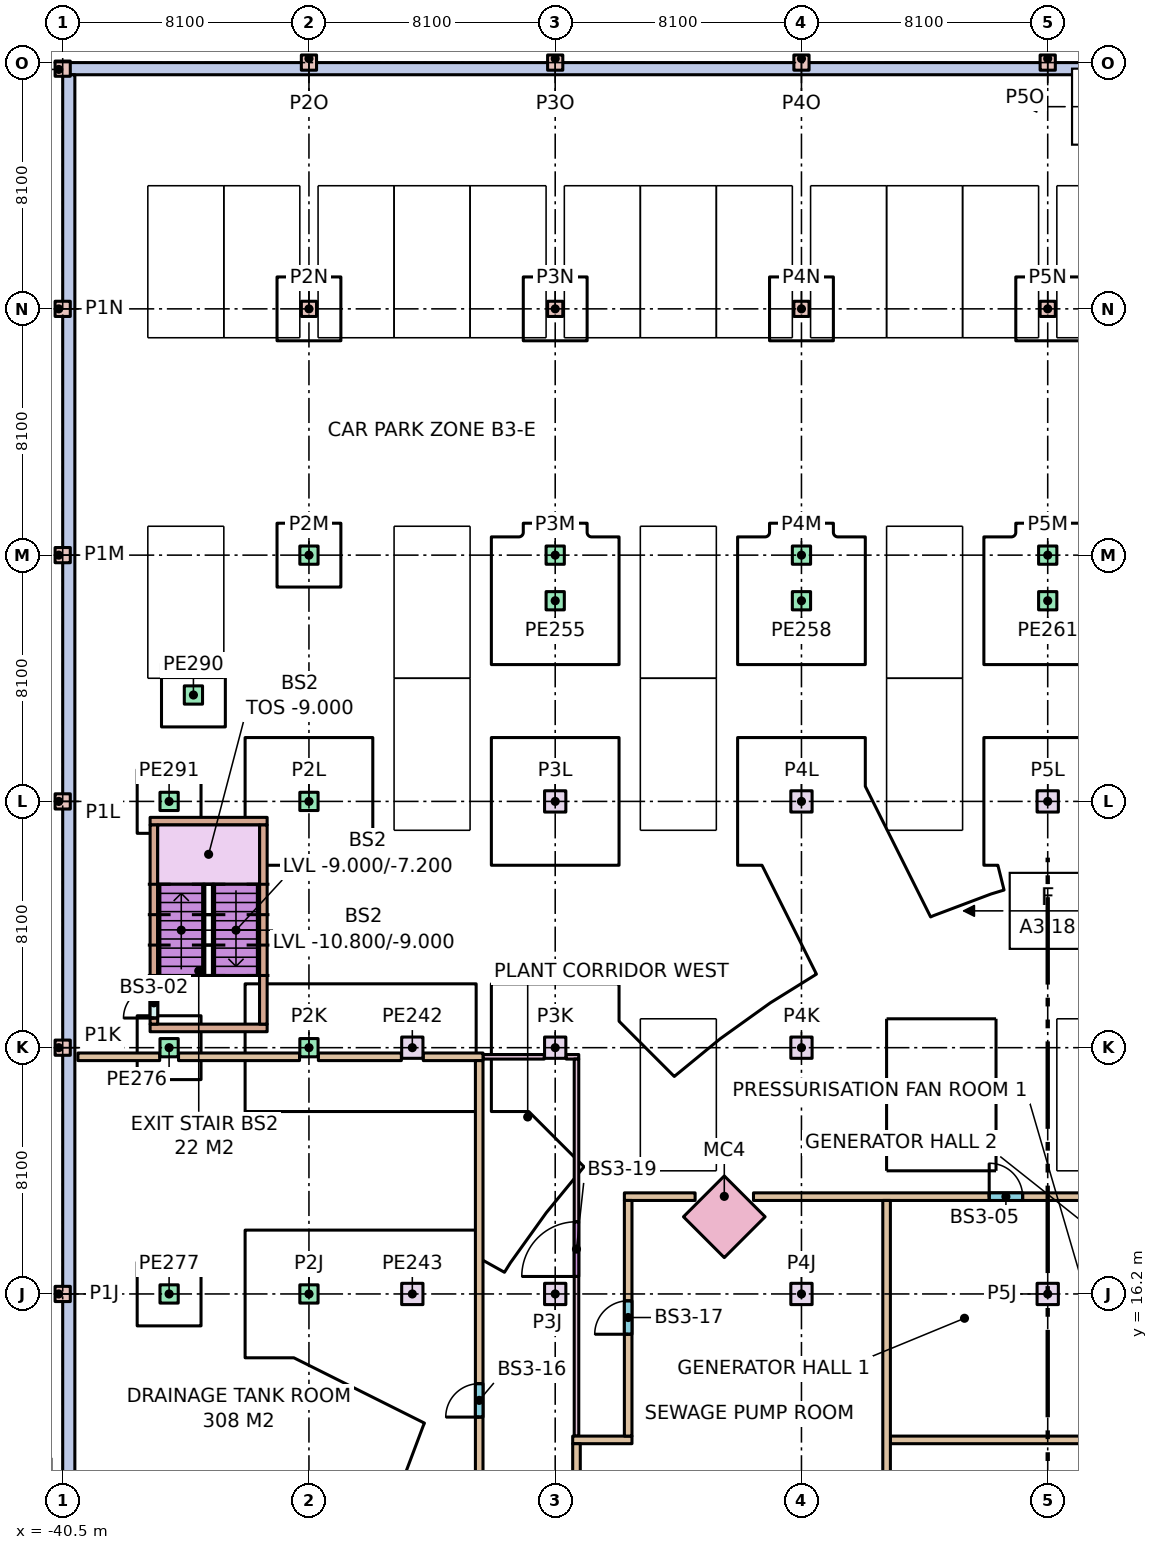
"""IFC4 building model, lengths in metres.
Left out: names, types, materials, properties, quantities, classifications, styles, units other than length and angle.
Written with IfcOpenShell. Run it as: python <this file> out.ifc"""

import sys

from ifc_helpers import new_model, si_unit, direction, frame, frame_2d, origin, origin_2d, place, context, subcontext, project, spatial, rectangle, extrude, element, fill, save


model = new_model("IFC4")
c1 = context("Model", 3, precision=1e-05, world=origin(), true_north=direction((0.0, 1.0)))
c2 = subcontext(c1, "Body", "Model", "MODEL_VIEW")
j1 = project(units=[si_unit("LENGTHUNIT", "METRE"), si_unit("PLANEANGLEUNIT", "RADIAN")], contexts=[c1])
p1 = place(None, origin())
s1 = spatial("IfcSite", under=j1, at=p1, CompositionType="ELEMENT")
p2 = place(p1, origin())
s2 = spatial("IfcBuilding", under=s1, at=p2, CompositionType="ELEMENT")
p3 = place(p2, frame((0.0, 0.0, -10.8)))
s3 = spatial("IfcBuildingStorey", under=s2, at=p3, CompositionType="ELEMENT", Elevation=-10.8)
p4 = place(p3, frame((-40.5, 56.5, 0.0), z_axis=(0.0, 0.0, 1.0), x_axis=(1.0, 0.0, 0.0)))
e1 = element("IfcWall", 1, at=p4, inside=s3, PredefinedType="SOLIDWALL", context=c2, shape_type="SweptSolid", body=[
    extrude(rectangle(XDim=129.6, YDim=0.4, at=frame_2d((64.8, 0.0))), origin(), (0.0, 0.0, 1.0), 3.6),
])
p5 = place(p3, frame((-40.3, -56.3, 0.0), z_axis=(0.0, 0.0, 1.0), x_axis=(0.0, 1.0, 0.0)))
e2 = element("IfcWall", 2, at=p5, inside=s3, PredefinedType="SOLIDWALL", context=c2, shape_type="SweptSolid", body=[
    extrude(rectangle(XDim=112.6, YDim=0.4, at=frame_2d((56.3, 0.0))), origin(), (0.0, 0.0, 1.0), 3.6),
])
for number, where, z_axis, x_axis in (
    (3, (-40.5, 16.2, 0.0), (0.0, 0.0, 1.0), (1.0, 0.0, 0.0)),
    (4, (-40.5, 24.3, 0.0), (0.0, 0.0, 1.0), (1.0, 0.0, 0.0)),
    (5, (-40.5, 32.4, 0.0), (0.0, 0.0, 1.0), (1.0, 0.0, 0.0)),
    (6, (-40.5, 40.5, 0.0), (0.0, 0.0, 1.0), (1.0, 0.0, 0.0)),
    (7, (-40.5, 48.6, 0.0), (0.0, 0.0, 1.0), (1.0, 0.0, 0.0)),
    (8, (-40.5, 56.5, 0.0), (0.0, 0.0, 1.0), (1.0, 0.0, 0.0)),
):
    element("IfcColumn", number, at=place(p3, frame(where, z_axis=z_axis, x_axis=x_axis)), inside=s3, PredefinedType="COLUMN", context=c2, shape_type="SweptSolid", body=[
        extrude(rectangle(XDim=0.5, YDim=0.5, at=origin_2d()), origin(), (0.0, 0.0, 1.0), 3.6),
    ])
for number, where, z_axis, x_axis in (
    (9, (-32.4, 16.2, 0.0), (0.0, 0.0, 1.0), (1.0, 0.0, 0.0)),
    (10, (-32.4, 24.3, 0.0), (0.0, 0.0, 1.0), (1.0, 0.0, 0.0)),
    (11, (-32.4, 32.4, 0.0), (0.0, 0.0, 1.0), (1.0, 0.0, 0.0)),
    (12, (-32.4, 40.5, 0.0), (0.0, 0.0, 1.0), (1.0, 0.0, 0.0)),
):
    element("IfcColumn", number, at=place(p3, frame(where, z_axis=z_axis, x_axis=x_axis)), inside=s3, PredefinedType="COLUMN", context=c2, shape_type="SweptSolid", body=[
        extrude(rectangle(XDim=0.6, YDim=0.6, at=origin_2d()), origin(), (0.0, 0.0, 1.0), 3.6),
    ])
for number, where, z_axis, x_axis in (
    (13, (-32.4, 48.6, 0.0), (0.0, 0.0, 1.0), (1.0, 0.0, 0.0)),
    (14, (-32.4, 56.7, 0.0), (0.0, 0.0, 1.0), (1.0, 0.0, 0.0)),
):
    element("IfcColumn", number, at=place(p3, frame(where, z_axis=z_axis, x_axis=x_axis)), inside=s3, PredefinedType="COLUMN", context=c2, shape_type="SweptSolid", body=[
        extrude(rectangle(XDim=0.5, YDim=0.5, at=origin_2d()), origin(), (0.0, 0.0, 1.0), 3.6),
    ])
for number, where, z_axis, x_axis in (
    (15, (-24.3, 16.2, 0.0), (0.0, 0.0, 1.0), (1.0, 0.0, 0.0)),
    (16, (-24.3, 24.3, 0.0), (0.0, 0.0, 1.0), (1.0, 0.0, 0.0)),
    (17, (-24.3, 32.4, 0.0), (0.0, 0.0, 1.0), (1.0, 0.0, 0.0)),
):
    element("IfcColumn", number, at=place(p3, frame(where, z_axis=z_axis, x_axis=x_axis)), inside=s3, PredefinedType="COLUMN", context=c2, shape_type="SweptSolid", body=[
        extrude(rectangle(XDim=0.7, YDim=0.7, at=origin_2d()), origin(), (0.0, 0.0, 1.0), 3.6),
    ])
p6 = place(p3, frame((-24.3, 40.5, 0.0), z_axis=(0.0, 0.0, 1.0), x_axis=(1.0, 0.0, 0.0)))
e18 = element("IfcColumn", 18, at=p6, inside=s3, PredefinedType="COLUMN", context=c2, shape_type="SweptSolid", body=[
    extrude(rectangle(XDim=0.6, YDim=0.6, at=origin_2d()), origin(), (0.0, 0.0, 1.0), 3.6),
])
for number, where, z_axis, x_axis in (
    (19, (-24.3, 48.6, 0.0), (0.0, 0.0, 1.0), (1.0, 0.0, 0.0)),
    (20, (-24.3, 56.7, 0.0), (0.0, 0.0, 1.0), (1.0, 0.0, 0.0)),
):
    element("IfcColumn", number, at=place(p3, frame(where, z_axis=z_axis, x_axis=x_axis)), inside=s3, PredefinedType="COLUMN", context=c2, shape_type="SweptSolid", body=[
        extrude(rectangle(XDim=0.5, YDim=0.5, at=origin_2d()), origin(), (0.0, 0.0, 1.0), 3.6),
    ])
for number, where, z_axis, x_axis in (
    (21, (-16.2, 16.2, 0.0), (0.0, 0.0, 1.0), (1.0, 0.0, 0.0)),
    (22, (-16.2, 24.3, 0.0), (0.0, 0.0, 1.0), (1.0, 0.0, 0.0)),
    (23, (-16.2, 32.4, 0.0), (0.0, 0.0, 1.0), (1.0, 0.0, 0.0)),
):
    element("IfcColumn", number, at=place(p3, frame(where, z_axis=z_axis, x_axis=x_axis)), inside=s3, PredefinedType="COLUMN", context=c2, shape_type="SweptSolid", body=[
        extrude(rectangle(XDim=0.7, YDim=0.7, at=origin_2d()), origin(), (0.0, 0.0, 1.0), 3.6),
    ])
p7 = place(p3, frame((-16.2, 40.5, 0.0), z_axis=(0.0, 0.0, 1.0), x_axis=(1.0, 0.0, 0.0)))
e24 = element("IfcColumn", 24, at=p7, inside=s3, PredefinedType="COLUMN", context=c2, shape_type="SweptSolid", body=[
    extrude(rectangle(XDim=0.6, YDim=0.6, at=origin_2d()), origin(), (0.0, 0.0, 1.0), 3.6),
])
for number, where, z_axis, x_axis in (
    (25, (-16.2, 48.6, 0.0), (0.0, 0.0, 1.0), (1.0, 0.0, 0.0)),
    (26, (-16.2, 56.7, 0.0), (0.0, 0.0, 1.0), (1.0, 0.0, 0.0)),
):
    element("IfcColumn", number, at=place(p3, frame(where, z_axis=z_axis, x_axis=x_axis)), inside=s3, PredefinedType="COLUMN", context=c2, shape_type="SweptSolid", body=[
        extrude(rectangle(XDim=0.5, YDim=0.5, at=origin_2d()), origin(), (0.0, 0.0, 1.0), 3.6),
    ])
for number, where, z_axis, x_axis in (
    (27, (-8.1, 16.2, 0.0), (0.0, 0.0, 1.0), (1.0, 0.0, 0.0)),
    (28, (-8.1, 32.4, 0.0), (0.0, 0.0, 1.0), (1.0, 0.0, 0.0)),
):
    element("IfcColumn", number, at=place(p3, frame(where, z_axis=z_axis, x_axis=x_axis)), inside=s3, PredefinedType="COLUMN", context=c2, shape_type="SweptSolid", body=[
        extrude(rectangle(XDim=0.7, YDim=0.7, at=origin_2d()), origin(), (0.0, 0.0, 1.0), 3.6),
    ])
p8 = place(p3, frame((-8.1, 40.5, 0.0), z_axis=(0.0, 0.0, 1.0), x_axis=(1.0, 0.0, 0.0)))
e29 = element("IfcColumn", 29, at=p8, inside=s3, PredefinedType="COLUMN", context=c2, shape_type="SweptSolid", body=[
    extrude(rectangle(XDim=0.6, YDim=0.6, at=origin_2d()), origin(), (0.0, 0.0, 1.0), 3.6),
])
for number, where, z_axis, x_axis in (
    (30, (-8.1, 48.6, 0.0), (0.0, 0.0, 1.0), (1.0, 0.0, 0.0)),
    (31, (-8.1, 56.7, 0.0), (0.0, 0.0, 1.0), (1.0, 0.0, 0.0)),
):
    element("IfcColumn", number, at=place(p3, frame(where, z_axis=z_axis, x_axis=x_axis)), inside=s3, PredefinedType="COLUMN", context=c2, shape_type="SweptSolid", body=[
        extrude(rectangle(XDim=0.5, YDim=0.5, at=origin_2d()), origin(), (0.0, 0.0, 1.0), 3.6),
    ])
for number, where, z_axis, x_axis in (
    (32, (-29.0, 24.3, 0.0), (0.0, 0.0, 1.0), (1.0, 0.0, 0.0)),
    (33, (-29.0, 16.2, 0.0), (0.0, 0.0, 1.0), (1.0, 0.0, 0.0)),
):
    element("IfcColumn", number, at=place(p3, frame(where, z_axis=z_axis, x_axis=x_axis)), inside=s3, PredefinedType="COLUMN", context=c2, shape_type="SweptSolid", body=[
        extrude(rectangle(XDim=0.7, YDim=0.7, at=origin_2d()), origin(), (0.0, 0.0, 1.0), 3.6),
    ])
for number, where, z_axis, x_axis in (
    (34, (-24.3, 39.0, 0.0), (0.0, 0.0, 1.0), (1.0, 0.0, 0.0)),
    (35, (-16.2, 39.0, 0.0), (0.0, 0.0, 1.0), (1.0, 0.0, 0.0)),
    (36, (-8.1, 39.0, 0.0), (0.0, 0.0, 1.0), (1.0, 0.0, 0.0)),
    (37, (-37.0, 24.3, 0.0), (0.0, 0.0, 1.0), (1.0, 0.0, 0.0)),
    (38, (-37.0, 16.2, 0.0), (0.0, 0.0, 1.0), (1.0, 0.0, 0.0)),
    (39, (-36.2, 35.9, 0.0), (0.0, 0.0, 1.0), (1.0, 0.0, 0.0)),
    (40, (-37.0, 32.4, 0.0), (0.0, 0.0, 1.0), (1.0, 0.0, 0.0)),
):
    element("IfcColumn", number, at=place(p3, frame(where, z_axis=z_axis, x_axis=x_axis)), inside=s3, PredefinedType="COLUMN", context=c2, shape_type="SweptSolid", body=[
        extrude(rectangle(XDim=0.6, YDim=0.6, at=origin_2d()), origin(), (0.0, 0.0, 1.0), 3.6),
    ])
p9 = place(p3, frame((-18.738, 18.738, 0.0), z_axis=(0.0, 0.0, 1.0), x_axis=(-0.707106781187, -0.707106781187, 0.0)))
e41 = element("IfcColumn", 41, at=p9, inside=s3, PredefinedType="COLUMN", context=c2, shape_type="SweptSolid", body=[
    extrude(rectangle(XDim=1.9, YDim=1.9, at=origin_2d()), origin(), (0.0, 0.0, 1.0), 3.6),
])
for number, where, z_axis, x_axis in (
    (42, (-37.625, 24.95, 0.0), (0.0, 0.0, 1.0), (1.0, 0.0, 0.0)),
    (43, (-37.625, 31.75, 0.0), (0.0, 0.0, 1.0), (1.0, 0.0, 0.0)),
):
    element("IfcWall", number, at=place(p3, frame(where, z_axis=z_axis, x_axis=x_axis)), inside=s3, PredefinedType="STANDARD", context=c2, shape_type="SweptSolid", body=[
        extrude(rectangle(XDim=3.85, YDim=0.25, at=frame_2d((1.925, 0.0))), origin(), (0.0, 0.0, 1.0), 3.28),
    ])
p10 = place(p3, frame((-37.5, 25.075, 0.0), z_axis=(0.0, 0.0, 1.0), x_axis=(0.0, 1.0, 0.0)))
e44 = element("IfcWall", 44, at=p10, inside=s3, PredefinedType="STANDARD", context=c2, shape_type="SweptSolid", body=[
    extrude(rectangle(XDim=6.55, YDim=0.25, at=frame_2d((3.275, 0.0))), origin(), (0.0, 0.0, 1.0), 3.28),
])
p11 = place(p10, frame((0.2, 0.0, 0.0)))
e45 = element("IfcOpeningElement", 45, at=p11, cuts=e44, PredefinedType="OPENING", context=c2, shape_type="SweptSolid", body=[
    extrude(rectangle(XDim=1.0, YDim=2.1, at=frame_2d((0.5, 1.05))), frame((0.0, 0.135, 0.0), z_axis=(0.0, -1.0, 0.0), x_axis=(1.0, 0.0, 0.0)), (0.0, 0.0, 1.0), 0.27),
])
p12 = place(p3, frame((-33.9, 25.075, 0.0), z_axis=(0.0, 0.0, 1.0), x_axis=(0.0, 1.0, 0.0)))
e46 = element("IfcWall", 46, at=p12, inside=s3, PredefinedType="STANDARD", context=c2, shape_type="SweptSolid", body=[
    extrude(rectangle(XDim=6.55, YDim=0.25, at=frame_2d((3.275, 0.0))), origin(), (0.0, 0.0, 1.0), 3.28),
])
p13 = place(p3, frame((-13.275, 11.4, 0.0), z_axis=(0.0, 0.0, 1.0), x_axis=(1.0, 0.0, 0.0)))
e47 = element("IfcWall", 47, at=p13, inside=s3, PredefinedType="PARTITIONING", context=c2, shape_type="SweptSolid", body=[
    extrude(rectangle(XDim=34.55, YDim=0.25, at=frame_2d((17.275, 0.0))), origin(), (0.0, 0.0, 1.0), 3.28),
])
p14 = place(p3, frame((-26.675, 24.0, 0.0), z_axis=(0.0, 0.0, 1.0), x_axis=(1.0, 0.0, 0.0)))
e48 = element("IfcWall", 48, at=p14, inside=s3, PredefinedType="PARTITIONING", context=c2, shape_type="SweptSolid", body=[
    extrude(rectangle(XDim=2.015, YDim=0.15, at=frame_2d((1.008, 0.0))), origin(), (0.0, 0.0, 1.0), 3.28),
])
p15 = place(p3, frame((-23.94, 24.0, 0.0), z_axis=(0.0, 0.0, 1.0), x_axis=(1.0, 0.0, 0.0)))
e49 = element("IfcWall", 49, at=p15, inside=s3, PredefinedType="PARTITIONING", context=c2, shape_type="SweptSolid", body=[
    extrude(rectangle(XDim=0.415, YDim=0.15, at=frame_2d((0.208, 0.0))), origin(), (0.0, 0.0, 1.0), 3.28),
])
p16 = place(p3, frame((-23.6, 11.525, 0.0), z_axis=(0.0, 0.0, 1.0), x_axis=(0.0, 1.0, 0.0)))
e50 = element("IfcWall", 50, at=p16, inside=s3, PredefinedType="PARTITIONING", context=c2, shape_type="SweptSolid", body=[
    extrude(rectangle(XDim=12.4, YDim=0.15, at=frame_2d((6.2, 0.0))), origin(), (0.0, 0.0, 1.0), 3.28),
])
p17 = place(p16, frame((5.25, 0.0, 0.0)))
e51 = element("IfcOpeningElement", 51, at=p17, cuts=e50, PredefinedType="OPENING", context=c2, shape_type="SweptSolid", body=[
    extrude(rectangle(XDim=1.8, YDim=2.4, at=frame_2d((0.9, 1.2))), frame((0.0, 0.085, 0.0), z_axis=(0.0, -1.0, 0.0), x_axis=(1.0, 0.0, 0.0)), (0.0, 0.0, 1.0), 0.17),
])
p18 = place(p3, frame((-40.0, 24.0, 0.0), z_axis=(0.0, 0.0, 1.0), x_axis=(1.0, 0.0, 0.0)))
e52 = element("IfcWall", 52, at=p18, inside=s3, PredefinedType="PARTITIONING", context=c2, shape_type="SweptSolid", body=[
    extrude(rectangle(XDim=2.69, YDim=0.25, at=frame_2d((1.345, 0.0))), origin(), (0.0, 0.0, 1.0), 3.28),
])
p19 = place(p3, frame((-36.69, 24.0, 0.0), z_axis=(0.0, 0.0, 1.0), x_axis=(1.0, 0.0, 0.0)))
e53 = element("IfcWall", 53, at=p19, inside=s3, PredefinedType="PARTITIONING", context=c2, shape_type="SweptSolid", body=[
    extrude(rectangle(XDim=3.98, YDim=0.25, at=frame_2d((1.99, 0.0))), origin(), (0.0, 0.0, 1.0), 3.28),
])
p20 = place(p3, frame((-32.09, 24.0, 0.0), z_axis=(0.0, 0.0, 1.0), x_axis=(1.0, 0.0, 0.0)))
e54 = element("IfcWall", 54, at=p20, inside=s3, PredefinedType="PARTITIONING", context=c2, shape_type="SweptSolid", body=[
    extrude(rectangle(XDim=2.73, YDim=0.25, at=frame_2d((1.365, 0.0))), origin(), (0.0, 0.0, 1.0), 3.28),
])
p21 = place(p3, frame((-28.64, 24.0, 0.0), z_axis=(0.0, 0.0, 1.0), x_axis=(1.0, 0.0, 0.0)))
e55 = element("IfcWall", 55, at=p21, inside=s3, PredefinedType="PARTITIONING", context=c2, shape_type="SweptSolid", body=[
    extrude(rectangle(XDim=1.965, YDim=0.25, at=frame_2d((0.982, 0.0))), origin(), (0.0, 0.0, 1.0), 3.28),
])
p22 = place(p3, frame((-23.725, 11.4, 0.0), z_axis=(0.0, 0.0, 1.0), x_axis=(1.0, 0.0, 0.0)))
e56 = element("IfcWall", 56, at=p22, inside=s3, PredefinedType="PARTITIONING", context=c2, shape_type="SweptSolid", body=[
    extrude(rectangle(XDim=1.95, YDim=0.25, at=frame_2d((0.975, 0.0))), origin(), (0.0, 0.0, 1.0), 3.28),
])
p23 = place(p3, frame((-22.025, 19.4, 0.0), z_axis=(0.0, 0.0, 1.0), x_axis=(1.0, 0.0, 0.0)))
e57 = element("IfcWall", 57, at=p23, inside=s3, PredefinedType="PARTITIONING", context=c2, shape_type="SweptSolid", body=[
    extrude(rectangle(XDim=2.327, YDim=0.25, at=frame_2d((1.163, 0.0))), origin(), (0.0, 0.0, 1.0), 3.28),
])
p24 = place(p3, frame((-17.778, 19.4, 0.0), z_axis=(0.0, 0.0, 1.0), x_axis=(1.0, 0.0, 0.0)))
e58 = element("IfcWall", 58, at=p24, inside=s3, PredefinedType="PARTITIONING", context=c2, shape_type="SweptSolid", body=[
    extrude(rectangle(XDim=35.557, YDim=0.25, at=frame_2d((17.778, 0.0))), origin(), (0.0, 0.0, 1.0), 3.28),
])
p25 = place(p24, frame((7.753, 0.0, 0.0)))
e59 = element("IfcOpeningElement", 59, at=p25, cuts=e58, PredefinedType="OPENING", context=c2, shape_type="SweptSolid", body=[
    extrude(rectangle(XDim=1.1, YDim=2.1, at=frame_2d((0.55, 1.05))), frame((0.0, 0.135, 0.0), z_axis=(0.0, -1.0, 0.0), x_axis=(1.0, 0.0, 0.0)), (0.0, 0.0, 1.0), 0.27),
])
p26 = place(p24, frame((15.41, 0.0, 0.0)))
e60 = element("IfcOpeningElement", 60, at=p26, cuts=e58, PredefinedType="OPENING", context=c2, shape_type="SweptSolid", body=[
    extrude(rectangle(XDim=1.1, YDim=2.1, at=frame_2d((0.55, 1.05))), frame((0.0, 0.135, 0.0), z_axis=(0.0, -1.0, 0.0), x_axis=(1.0, 0.0, 0.0)), (0.0, 0.0, 1.0), 0.27),
])
p27 = place(p24, frame((22.167, 0.0, 0.0)))
e61 = element("IfcOpeningElement", 61, at=p27, cuts=e58, PredefinedType="OPENING", context=c2, shape_type="SweptSolid", body=[
    extrude(rectangle(XDim=1.0, YDim=2.1, at=frame_2d((0.5, 1.05))), frame((0.0, 0.135, 0.0), z_axis=(0.0, -1.0, 0.0), x_axis=(1.0, 0.0, 0.0)), (0.0, 0.0, 1.0), 0.27),
])
p28 = place(p24, frame((30.01, 0.0, 0.0)))
e62 = element("IfcOpeningElement", 62, at=p28, cuts=e58, PredefinedType="OPENING", context=c2, shape_type="SweptSolid", body=[
    extrude(rectangle(XDim=1.1, YDim=2.1, at=frame_2d((0.55, 1.05))), frame((0.0, 0.135, 0.0), z_axis=(0.0, -1.0, 0.0), x_axis=(1.0, 0.0, 0.0)), (0.0, 0.0, 1.0), 0.27),
])
p29 = place(p3, frame((-21.9, 11.525, 0.0), z_axis=(0.0, 0.0, 1.0), x_axis=(0.0, 1.0, 0.0)))
e63 = element("IfcWall", 63, at=p29, inside=s3, PredefinedType="PARTITIONING", context=c2, shape_type="SweptSolid", body=[
    extrude(rectangle(XDim=7.75, YDim=0.25, at=frame_2d((3.875, 0.0))), origin(), (0.0, 0.0, 1.0), 3.28),
])
p30 = place(p29, frame((3.35, 0.0, 0.0)))
e64 = element("IfcOpeningElement", 64, at=p30, cuts=e63, PredefinedType="OPENING", context=c2, shape_type="SweptSolid", body=[
    extrude(rectangle(XDim=1.1, YDim=2.1, at=frame_2d((0.55, 1.05))), frame((0.0, 0.135, 0.0), z_axis=(0.0, -1.0, 0.0), x_axis=(1.0, 0.0, 0.0)), (0.0, 0.0, 1.0), 0.27),
])
p31 = place(p3, frame((-26.8, 0.96, 0.0), z_axis=(0.0, 0.0, 1.0), x_axis=(0.0, 1.0, 0.0)))
e65 = element("IfcWall", 65, at=p31, inside=s3, PredefinedType="PARTITIONING", context=c2, shape_type="SweptSolid", body=[
    extrude(rectangle(XDim=22.915, YDim=0.25, at=frame_2d((11.458, 0.0))), origin(), (0.0, 0.0, 1.0), 3.28),
])
p32 = place(p31, frame((11.19, 0.0, 0.0)))
e66 = element("IfcOpeningElement", 66, at=p32, cuts=e65, PredefinedType="OPENING", context=c2, shape_type="SweptSolid", body=[
    extrude(rectangle(XDim=1.1, YDim=2.1, at=frame_2d((0.55, 1.05))), frame((0.0, 0.135, 0.0), z_axis=(0.0, -1.0, 0.0), x_axis=(1.0, 0.0, 0.0)), (0.0, 0.0, 1.0), 0.27),
])
p33 = place(p3, frame((-23.6, 1.725, 0.0), z_axis=(0.0, 0.0, 1.0), x_axis=(0.0, 1.0, 0.0)))
e67 = element("IfcWall", 67, at=p33, inside=s3, PredefinedType="PARTITIONING", context=c2, shape_type="SweptSolid", body=[
    extrude(rectangle(XDim=9.55, YDim=0.25, at=frame_2d((4.775, 0.0))), origin(), (0.0, 0.0, 1.0), 3.28),
])
p34 = place(p3, frame((-13.4, 1.725, 0.0), z_axis=(0.0, 0.0, 1.0), x_axis=(0.0, 1.0, 0.0)))
e68 = element("IfcWall", 68, at=p34, inside=s3, PredefinedType="PARTITIONING", context=c2, shape_type="SweptSolid", body=[
    extrude(rectangle(XDim=17.55, YDim=0.25, at=frame_2d((8.775, 0.0))), origin(), (0.0, 0.0, 1.0), 3.28),
])
p35 = place(p11, origin())
e69 = element("IfcDoor", 69, at=p35, inside=s3, OperationType="SINGLE_SWING_LEFT", PredefinedType="DOOR", context=c2, shape_type="SweptSolid", body=[
    extrude(rectangle(XDim=1.0, YDim=2.1, at=frame_2d((0.5, 1.05))), frame((0.0, 0.025, 0.0), z_axis=(0.0, -1.0, 0.0), x_axis=(1.0, 0.0, 0.0)), (0.0, 0.0, 1.0), 0.05),
])
fill(e45, e69)
p36 = place(p25, origin())
e70 = element("IfcDoor", 70, at=p36, inside=s3, OperationType="SINGLE_SWING_LEFT", PredefinedType="DOOR", context=c2, shape_type="SweptSolid", body=[
    extrude(rectangle(XDim=1.1, YDim=2.1, at=frame_2d((0.55, 1.05))), frame((0.0, 0.025, 0.0), z_axis=(0.0, -1.0, 0.0), x_axis=(1.0, 0.0, 0.0)), (0.0, 0.0, 1.0), 0.05),
])
fill(e59, e70)
p37 = place(p32, origin())
e71 = element("IfcDoor", 71, at=p37, inside=s3, OperationType="SINGLE_SWING_LEFT", PredefinedType="DOOR", context=c2, shape_type="SweptSolid", body=[
    extrude(rectangle(XDim=1.1, YDim=2.1, at=frame_2d((0.55, 1.05))), frame((0.0, 0.025, 0.0), z_axis=(0.0, -1.0, 0.0), x_axis=(1.0, 0.0, 0.0)), (0.0, 0.0, 1.0), 0.05),
])
fill(e66, e71)
p38 = place(p30, origin())
e72 = element("IfcDoor", 72, at=p38, inside=s3, OperationType="SINGLE_SWING_LEFT", PredefinedType="DOOR", context=c2, shape_type="SweptSolid", body=[
    extrude(rectangle(XDim=1.1, YDim=2.1, at=frame_2d((0.55, 1.05))), frame((0.0, 0.025, 0.0), z_axis=(0.0, -1.0, 0.0), x_axis=(1.0, 0.0, 0.0)), (0.0, 0.0, 1.0), 0.05),
])
fill(e64, e72)
p39 = place(p17, origin())
e73 = element("IfcDoor", 73, at=p39, inside=s3, OperationType="SINGLE_SWING_LEFT", PredefinedType="DOOR", context=c2, shape_type="SweptSolid", body=[
    extrude(rectangle(XDim=1.8, YDim=2.4, at=frame_2d((0.9, 1.2))), frame((0.0, 0.025, 0.0), z_axis=(0.0, -1.0, 0.0), x_axis=(1.0, 0.0, 0.0)), (0.0, 0.0, 1.0), 0.05),
])
fill(e51, e73)
save(model, sys.argv[1])
